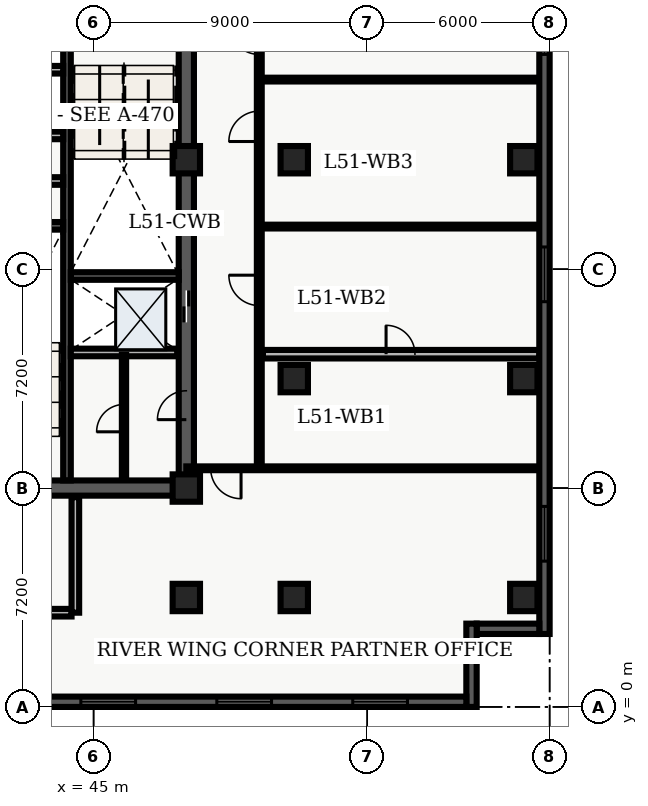
"""IFC4 building model, lengths in metres.
Left out: names, types, materials, properties, quantities, classifications, styles, units other than length and angle.
Written with IfcOpenShell. Run it as: python <this file> out.ifc"""

import sys

from ifc_helpers import new_model, entity, si_unit, converted_unit, direction, frame, origin_with_axes, origin_2d_with_axis, place, context, subcontext, project, spatial, polyline, rectangle, outline, extrude, element, fill, save


model = new_model("IFC4")
c1 = context("Model", 3, precision=1e-05, world=origin_with_axes(), true_north=direction((0.0, 1.0)))
c2 = subcontext(c1, "Body", "Model", "MODEL_VIEW")
j1 = project(units=[si_unit("LENGTHUNIT", "METRE"), converted_unit("PLANEANGLEUNIT", "DEGREE", entity("IfcPlaneAngleMeasure", 0.017), si_unit("PLANEANGLEUNIT", "RADIAN"), dimensions=[0, 0, 0, 0, 0, 0, 0])], contexts=[c1])
p1 = place(None, origin_with_axes())
s1 = spatial("IfcSite", under=j1, at=p1, CompositionType="ELEMENT")
p2 = place(p1, origin_with_axes())
s2 = spatial("IfcBuilding", under=s1, at=p2, CompositionType="ELEMENT")
p3 = place(p2, frame((0.0, 0.0, 208.2), z_axis=(0.0, 0.0, 1.0), x_axis=(1.0, 0.0, 0.0)))
s3 = spatial("IfcBuildingStorey", under=s2, at=p3, CompositionType="ELEMENT", Elevation=208.2)
p4 = place(p3, frame((40.2, 7.2, 0.0), z_axis=(0.0, 0.0, 1.0), x_axis=(1.0, 0.0, 0.0)))
e1 = element("IfcWall", 1, at=p4, inside=s3, PredefinedType="SHEAR", context=c2, shape_type="SweptSolid", body=[
    extrude(outline(polyline([(0.0, -0.25), (7.85, -0.25), (7.85, 0.25), (0.0, 0.25), (0.0, -0.25)])), origin_with_axes(), (0.0, 0.0, 1.0), 3.66),
])
p5 = place(p4, frame((2.175, 0.0, 0.0), z_axis=(0.0, 0.0, 1.0), x_axis=(1.0, 0.0, 0.0)))
e2 = element("IfcOpeningElement", 2, at=p5, cuts=e1, PredefinedType="OPENING", context=c2, shape_type="SweptSolid", body=[
    extrude(rectangle(XDim=1.05, YDim=0.52, at=origin_2d_with_axis()), origin_with_axes(), (0.0, 0.0, 1.0), 2.15),
])
p6 = place(p3, frame((48.05, 7.2, 0.0), z_axis=(0.0, 0.0, 1.0), x_axis=(0.0, 1.0, 0.0)))
e3 = element("IfcWall", 3, at=p6, inside=s3, PredefinedType="SHEAR", context=c2, shape_type="SweptSolid", body=[
    extrude(outline(polyline([(0.0, -0.25), (15.6, -0.25), (15.6, 0.25), (0.0, 0.25), (0.0, -0.25)])), origin_with_axes(), (0.0, 0.0, 1.0), 3.66),
])
p7 = place(p6, frame((5.975, 0.0, 0.0), z_axis=(0.0, 0.0, 1.0), x_axis=(1.0, 0.0, 0.0)))
e4 = element("IfcOpeningElement", 4, at=p7, cuts=e3, PredefinedType="OPENING", context=c2, shape_type="SweptSolid", body=[
    extrude(rectangle(XDim=1.05, YDim=0.52, at=origin_2d_with_axis()), origin_with_axes(), (0.0, 0.0, 1.0), 2.15),
])
p8 = place(p6, frame((2.725, 0.0, 0.0), z_axis=(0.0, 0.0, 1.0), x_axis=(1.0, 0.0, 0.0)))
e5 = element("IfcOpeningElement", 5, at=p8, cuts=e3, PredefinedType="OPENING", context=c2, shape_type="SweptSolid", body=[
    extrude(rectangle(XDim=0.95, YDim=0.52, at=origin_2d_with_axis()), origin_with_axes(), (0.0, 0.0, 1.0), 2.15),
])
p9 = place(p3, frame((44.125, 7.45, 0.0), z_axis=(0.0, 0.0, 1.0), x_axis=(0.0, 1.0, 0.0)))
e6 = element("IfcWall", 6, at=p9, inside=s3, PredefinedType="SHEAR", context=c2, shape_type="SweptSolid", body=[
    extrude(outline(polyline([(0.0, -0.125), (15.1, -0.125), (15.1, 0.125), (0.0, 0.125), (0.0, -0.125)])), origin_with_axes(), (0.0, 0.0, 1.0), 3.66),
])
for number, where, z_axis, x_axis in (
    (7, (40.45, 15.825, 0.0), (0.0, 0.0, 1.0), (1.0, 0.0, 0.0)),
    (8, (44.25, 14.175, 0.0), (0.0, 0.0, 1.0), (1.0, 0.0, 0.0)),
):
    element("IfcWall", number, at=place(p3, frame(where, z_axis=z_axis, x_axis=x_axis)), inside=s3, PredefinedType="SHEAR", context=c2, shape_type="SweptSolid", body=[
        extrude(outline(polyline([(0.0, -0.125), (3.55, -0.125), (3.55, 0.125), (0.0, 0.125), (0.0, -0.125)])), origin_with_axes(), (0.0, 0.0, 1.0), 3.66),
    ])
p10 = place(p3, frame((40.5, 17.3, 0.0), z_axis=(0.0, 0.0, 1.0), x_axis=(1.0, 0.0, 0.0)))
e9 = element("IfcWall", 9, at=p10, inside=s3, PredefinedType="SOLIDWALL", context=c2, shape_type="SweptSolid", body=[
    extrude(outline(polyline([(0.0, -0.125), (3.5, -0.125), (3.5, 0.125), (0.0, 0.125), (0.0, -0.125)])), origin_with_axes(), (0.0, 0.0, 1.0), 2.7),
])
p11 = place(p10, frame((2.4, 0.0, 0.0), z_axis=(0.0, 0.0, 1.0), x_axis=(1.0, 0.0, 0.0)))
e10 = element("IfcOpeningElement", 10, at=p11, cuts=e9, PredefinedType="OPENING", context=c2, shape_type="SweptSolid", body=[
    extrude(rectangle(XDim=0.9, YDim=0.27, at=origin_2d_with_axis()), origin_with_axes(), (0.0, 0.0, 1.0), 2.15),
])
p12 = place(p3, frame((40.5, 18.8, 0.0), z_axis=(0.0, 0.0, 1.0), x_axis=(1.0, 0.0, 0.0)))
e11 = element("IfcWall", 11, at=p12, inside=s3, PredefinedType="SOLIDWALL", context=c2, shape_type="SweptSolid", body=[
    extrude(outline(polyline([(0.0, -0.125), (3.5, -0.125), (3.5, 0.125), (0.0, 0.125), (0.0, -0.125)])), origin_with_axes(), (0.0, 0.0, 1.0), 2.7),
])
p13 = place(p3, frame((40.325, 3.1, 0.0), z_axis=(0.0, 0.0, 1.0), x_axis=(1.0, 0.0, 0.0)))
e12 = element("IfcWall", 12, at=p13, inside=s3, PredefinedType="SOLIDWALL", context=c2, shape_type="SweptSolid", body=[
    extrude(outline(polyline([(0.0, -0.125), (3.95, -0.125), (3.95, 0.125), (0.0, 0.125), (0.0, -0.125)])), origin_with_axes(), (0.0, 0.0, 1.0), 2.7),
])
p14 = place(p3, frame((44.4, 3.1, 0.0), z_axis=(0.0, 0.0, 1.0), x_axis=(0.0, 1.0, 0.0)))
e13 = element("IfcWall", 13, at=p14, inside=s3, PredefinedType="SOLIDWALL", context=c2, shape_type="SweptSolid", body=[
    extrude(outline(polyline([(0.0, -0.125), (3.8, -0.125), (3.8, 0.125), (0.0, 0.125), (0.0, -0.125)])), origin_with_axes(), (0.0, 0.0, 1.0), 2.7),
])
for number, where, z_axis, x_axis in (
    (14, (48.05, 3.6, 0.0), (0.0, 0.0, 1.0), (1.0, 0.0, 0.0)),
    (15, (48.05, 7.2, 0.0), (0.0, 0.0, 1.0), (1.0, 0.0, 0.0)),
    (16, (48.05, 18.0, 0.0), (0.0, 0.0, 1.0), (1.0, 0.0, 0.0)),
    (17, (51.6, 3.6, 0.0), (0.0, 0.0, 1.0), (1.0, 0.0, 0.0)),
    (18, (51.6, 10.8, 0.0), (0.0, 0.0, 1.0), (1.0, 0.0, 0.0)),
    (19, (51.6, 18.0, 0.0), (0.0, 0.0, 1.0), (1.0, 0.0, 0.0)),
    (20, (59.15, 3.6, 0.0), (0.0, 0.0, 1.0), (1.0, 0.0, 0.0)),
    (21, (59.15, 10.8, 0.0), (0.0, 0.0, 1.0), (1.0, 0.0, 0.0)),
    (22, (59.15, 18.0, 0.0), (0.0, 0.0, 1.0), (1.0, 0.0, 0.0)),
):
    element("IfcColumn", number, at=place(p3, frame(where, z_axis=z_axis, x_axis=x_axis)), inside=s3, PredefinedType="COLUMN", context=c2, shape_type="SweptSolid", body=[
        extrude(rectangle(XDim=0.9, YDim=0.9, at=origin_2d_with_axis()), origin_with_axes(), (0.0, 0.0, 1.0), 3.9),
    ])
for number, where, z_axis, x_axis in (
    (23, (40.5, 20.96, 0.0), (0.0, 0.0, 1.0), (1.0, 0.0, 0.0)),
    (24, (44.25, 11.66, 0.0), (0.0, 0.0, 1.0), (1.0, 0.0, 0.0)),
):
    element("IfcWall", number, at=place(p3, frame(where, z_axis=z_axis, x_axis=x_axis)), inside=s3, PredefinedType="SOLIDWALL", context=c2, shape_type="SweptSolid", body=[
        extrude(outline(polyline([(0.0, -0.125), (3.5, -0.125), (3.5, 0.125), (0.0, 0.125), (0.0, -0.125)])), origin_with_axes(), (0.0, 0.0, 1.0), 2.7),
    ])
p15 = place(p3, frame((46.0, 7.5, 0.0), z_axis=(0.0, 0.0, 1.0), x_axis=(0.0, 1.0, 0.0)))
e25 = element("IfcWall", 25, at=p15, inside=s3, PredefinedType="PARTITIONING", context=c2, shape_type="SweptSolid", body=[
    extrude(outline(polyline([(0.0, -0.07), (4.08, -0.07), (4.08, 0.07), (0.0, 0.07), (0.0, -0.07)])), origin_with_axes(), (0.0, 0.0, 1.0), 2.7),
])
p16 = place(p15, frame((2.0, 0.0, 0.0), z_axis=(0.0, 0.0, 1.0), x_axis=(1.0, 0.0, 0.0)))
e26 = element("IfcOpeningElement", 26, at=p16, cuts=e25, PredefinedType="OPENING", context=c2, shape_type="SweptSolid", body=[
    extrude(rectangle(XDim=0.9, YDim=0.16, at=origin_2d_with_axis()), origin_with_axes(), (0.0, 0.0, 1.0), 2.15),
])
p17 = place(p3, frame((50.45, 7.85, 0.0), z_axis=(0.0, 0.0, 1.0), x_axis=(0.0, 1.0, 0.0)))
e27 = element("IfcWall", 27, at=p17, inside=s3, PredefinedType="PARTITIONING", context=c2, shape_type="SweptSolid", body=[
    extrude(outline(polyline([(0.0, -0.08), (18.8, -0.08), (18.8, 0.08), (0.0, 0.08), (0.0, -0.08)])), origin_with_axes(), (0.0, 0.0, 1.0), 2.7),
])
p18 = place(p17, frame((5.852, 0.0, 0.0), z_axis=(0.0, 0.0, 1.0), x_axis=(1.0, 0.0, 0.0)))
e28 = element("IfcOpeningElement", 28, at=p18, cuts=e27, PredefinedType="OPENING", context=c2, shape_type="SweptSolid", body=[
    extrude(rectangle(XDim=1.0, YDim=0.18, at=origin_2d_with_axis()), origin_with_axes(), (0.0, 0.0, 1.0), 2.15),
])
p19 = place(p17, frame((11.249, 0.0, 0.0), z_axis=(0.0, 0.0, 1.0), x_axis=(1.0, 0.0, 0.0)))
e29 = element("IfcOpeningElement", 29, at=p19, cuts=e27, PredefinedType="OPENING", context=c2, shape_type="SweptSolid", body=[
    extrude(rectangle(XDim=1.0, YDim=0.18, at=origin_2d_with_axis()), origin_with_axes(), (0.0, 0.0, 1.0), 2.15),
])
p20 = place(p17, frame((14.113, 0.0, 0.0), z_axis=(0.0, 0.0, 1.0), x_axis=(1.0, 0.0, 0.0)))
e30 = element("IfcOpeningElement", 30, at=p20, cuts=e27, PredefinedType="OPENING", context=c2, shape_type="SweptSolid", body=[
    extrude(rectangle(XDim=1.0, YDim=0.18, at=origin_2d_with_axis()), origin_with_axes(), (0.0, 0.0, 1.0), 2.15),
])
p21 = place(p3, frame((59.665, 7.85, 0.0), z_axis=(0.0, 0.0, 1.0), x_axis=(-1.0, 0.0, 0.0)))
e31 = element("IfcWall", 31, at=p21, inside=s3, PredefinedType="PARTITIONING", context=c2, shape_type="SweptSolid", body=[
    extrude(outline(polyline([(0.0, -0.062), (11.615, -0.062), (11.615, 0.062), (0.0, 0.062), (0.0, -0.062)])), origin_with_axes(), (0.0, 0.0, 1.0), 2.7),
])
p22 = place(p21, frame((10.315, 0.0, 0.0), z_axis=(0.0, 0.0, 1.0), x_axis=(1.0, 0.0, 0.0)))
e32 = element("IfcOpeningElement", 32, at=p22, cuts=e31, PredefinedType="OPENING", context=c2, shape_type="SweptSolid", body=[
    extrude(rectangle(XDim=1.0, YDim=0.145, at=origin_2d_with_axis()), origin_with_axes(), (0.0, 0.0, 1.0), 2.15),
])
p23 = place(p3, frame((50.57, 11.603, 0.0), z_axis=(0.0, 0.0, 1.0), x_axis=(1.0, 0.0, 0.0)))
e33 = element("IfcWall", 33, at=p23, inside=s3, PredefinedType="PARTITIONING", context=c2, shape_type="SweptSolid", body=[
    extrude(outline(polyline([(0.0, -0.14), (9.095, -0.14), (9.095, 0.14), (0.0, 0.14), (0.0, -0.14)])), origin_with_axes(), (0.0, 0.0, 1.0), 2.7),
])
p24 = place(p23, frame((4.525, 0.0, 0.0), z_axis=(0.0, 0.0, 1.0), x_axis=(1.0, 0.0, 0.0)))
e34 = element("IfcOpeningElement", 34, at=p24, cuts=e33, PredefinedType="OPENING", context=c2, shape_type="SweptSolid", body=[
    extrude(rectangle(XDim=0.95, YDim=0.3, at=origin_2d_with_axis()), origin_with_axes(), (0.0, 0.0, 1.0), 2.15),
])
for number, where, z_axis, x_axis in (
    (35, (50.57, 15.801, 0.0), (0.0, 0.0, 1.0), (1.0, 0.0, 0.0)),
    (36, (50.57, 20.636, 0.0), (0.0, 0.0, 1.0), (1.0, 0.0, 0.0)),
):
    element("IfcWall", number, at=place(p3, frame(where, z_axis=z_axis, x_axis=x_axis)), inside=s3, PredefinedType="PARTITIONING", context=c2, shape_type="SweptSolid", body=[
        extrude(outline(polyline([(0.0, -0.062), (9.095, -0.062), (9.095, 0.062), (0.0, 0.062), (0.0, -0.062)])), origin_with_axes(), (0.0, 0.0, 1.0), 2.7),
    ])
p25 = place(p3, frame((59.83, 26.06, 0.0), z_axis=(0.0, 0.0, 1.0), x_axis=(0.0, -1.0, 0.0)))
e37 = element("IfcWall", 37, at=p25, inside=s3, PredefinedType="SOLIDWALL", context=c2, shape_type="SweptSolid", body=[
    extrude(outline(polyline([(0.0, -0.17), (23.66, -0.17), (23.66, 0.17), (0.0, 0.17), (0.0, -0.17)])), origin_with_axes(), (0.0, 0.0, 1.0), 3.66),
])
p26 = place(p25, frame((3.696, 0.0, 0.45), z_axis=(0.0, 0.0, 1.0), x_axis=(1.0, 0.0, 0.0)))
e38 = element("IfcOpeningElement", 38, at=p26, cuts=e37, PredefinedType="OPENING", context=c2, shape_type="SweptSolid", body=[
    extrude(rectangle(XDim=1.8, YDim=0.36, at=origin_2d_with_axis()), origin_with_axes(), (0.0, 0.0, 1.0), 2.1),
])
p27 = place(p25, frame((11.83, 0.0, 0.45), z_axis=(0.0, 0.0, 1.0), x_axis=(1.0, 0.0, 0.0)))
e39 = element("IfcOpeningElement", 39, at=p27, cuts=e37, PredefinedType="OPENING", context=c2, shape_type="SweptSolid", body=[
    extrude(rectangle(XDim=1.8, YDim=0.36, at=origin_2d_with_axis()), origin_with_axes(), (0.0, 0.0, 1.0), 2.1),
])
p28 = place(p25, frame((20.364, 0.0, 0.45), z_axis=(0.0, 0.0, 1.0), x_axis=(1.0, 0.0, 0.0)))
e40 = element("IfcOpeningElement", 40, at=p28, cuts=e37, PredefinedType="OPENING", context=c2, shape_type="SweptSolid", body=[
    extrude(rectangle(XDim=1.8, YDim=0.36, at=origin_2d_with_axis()), origin_with_axes(), (0.0, 0.0, 1.0), 2.1),
])
p29 = place(p3, frame((59.66, 2.57, 0.0), z_axis=(0.0, 0.0, 1.0), x_axis=(-1.0, 0.0, 0.0)))
e41 = element("IfcWall", 41, at=p29, inside=s3, PredefinedType="SOLIDWALL", context=c2, shape_type="SweptSolid", body=[
    extrude(outline(polyline([(0.0, -0.17), (2.06, -0.17), (2.06, 0.17), (0.0, 0.17), (0.0, -0.17)])), origin_with_axes(), (0.0, 0.0, 1.0), 3.66),
])
p30 = place(p3, frame((57.43, 2.74, 0.0), z_axis=(0.0, 0.0, 1.0), x_axis=(0.0, -1.0, 0.0)))
e42 = element("IfcWall", 42, at=p30, inside=s3, PredefinedType="SOLIDWALL", context=c2, shape_type="SweptSolid", body=[
    extrude(outline(polyline([(0.0, -0.17), (2.74, -0.17), (2.74, 0.17), (0.0, 0.17), (0.0, -0.17)])), origin_with_axes(), (0.0, 0.0, 1.0), 3.66),
])
p31 = place(p3, frame((57.26, 0.17, 0.0), z_axis=(0.0, 0.0, 1.0), x_axis=(-1.0, 0.0, 0.0)))
e43 = element("IfcWall", 43, at=p31, inside=s3, PredefinedType="SOLIDWALL", context=c2, shape_type="SweptSolid", body=[
    extrude(outline(polyline([(0.0, -0.17), (54.86, -0.17), (54.86, 0.17), (0.0, 0.17), (0.0, -0.17)])), origin_with_axes(), (0.0, 0.0, 1.0), 3.66),
])
p32 = place(p31, frame((2.836, 0.0, 0.45), z_axis=(0.0, 0.0, 1.0), x_axis=(1.0, 0.0, 0.0)))
e44 = element("IfcOpeningElement", 44, at=p32, cuts=e43, PredefinedType="OPENING", context=c2, shape_type="SweptSolid", body=[
    extrude(rectangle(XDim=1.8, YDim=0.36, at=origin_2d_with_axis()), origin_with_axes(), (0.0, 0.0, 1.0), 2.1),
])
p33 = place(p31, frame((7.307, 0.0, 0.45), z_axis=(0.0, 0.0, 1.0), x_axis=(1.0, 0.0, 0.0)))
e45 = element("IfcOpeningElement", 45, at=p33, cuts=e43, PredefinedType="OPENING", context=c2, shape_type="SweptSolid", body=[
    extrude(rectangle(XDim=1.8, YDim=0.36, at=origin_2d_with_axis()), origin_with_axes(), (0.0, 0.0, 1.0), 2.1),
])
p34 = place(p31, frame((11.779, 0.0, 0.45), z_axis=(0.0, 0.0, 1.0), x_axis=(1.0, 0.0, 0.0)))
e46 = element("IfcOpeningElement", 46, at=p34, cuts=e43, PredefinedType="OPENING", context=c2, shape_type="SweptSolid", body=[
    extrude(rectangle(XDim=1.8, YDim=0.36, at=origin_2d_with_axis()), origin_with_axes(), (0.0, 0.0, 1.0), 2.1),
])
p35 = place(p31, frame((16.251, 0.0, 0.45), z_axis=(0.0, 0.0, 1.0), x_axis=(1.0, 0.0, 0.0)))
e47 = element("IfcOpeningElement", 47, at=p35, cuts=e43, PredefinedType="OPENING", context=c2, shape_type="SweptSolid", body=[
    extrude(rectangle(XDim=1.8, YDim=0.36, at=origin_2d_with_axis()), origin_with_axes(), (0.0, 0.0, 1.0), 2.1),
])
p36 = place(p31, frame((20.723, 0.0, 0.45), z_axis=(0.0, 0.0, 1.0), x_axis=(1.0, 0.0, 0.0)))
e48 = element("IfcOpeningElement", 48, at=p36, cuts=e43, PredefinedType="OPENING", context=c2, shape_type="SweptSolid", body=[
    extrude(rectangle(XDim=1.8, YDim=0.36, at=origin_2d_with_axis()), origin_with_axes(), (0.0, 0.0, 1.0), 2.1),
])
p37 = place(p31, frame((25.194, 0.0, 0.45), z_axis=(0.0, 0.0, 1.0), x_axis=(1.0, 0.0, 0.0)))
e49 = element("IfcOpeningElement", 49, at=p37, cuts=e43, PredefinedType="OPENING", context=c2, shape_type="SweptSolid", body=[
    extrude(rectangle(XDim=1.8, YDim=0.36, at=origin_2d_with_axis()), origin_with_axes(), (0.0, 0.0, 1.0), 2.1),
])
p38 = place(p31, frame((29.666, 0.0, 0.45), z_axis=(0.0, 0.0, 1.0), x_axis=(1.0, 0.0, 0.0)))
e50 = element("IfcOpeningElement", 50, at=p38, cuts=e43, PredefinedType="OPENING", context=c2, shape_type="SweptSolid", body=[
    extrude(rectangle(XDim=1.8, YDim=0.36, at=origin_2d_with_axis()), origin_with_axes(), (0.0, 0.0, 1.0), 2.1),
])
p39 = place(p31, frame((34.138, 0.0, 0.45), z_axis=(0.0, 0.0, 1.0), x_axis=(1.0, 0.0, 0.0)))
e51 = element("IfcOpeningElement", 51, at=p39, cuts=e43, PredefinedType="OPENING", context=c2, shape_type="SweptSolid", body=[
    extrude(rectangle(XDim=1.8, YDim=0.36, at=origin_2d_with_axis()), origin_with_axes(), (0.0, 0.0, 1.0), 2.1),
])
p40 = place(p31, frame((38.609, 0.0, 0.45), z_axis=(0.0, 0.0, 1.0), x_axis=(1.0, 0.0, 0.0)))
e52 = element("IfcOpeningElement", 52, at=p40, cuts=e43, PredefinedType="OPENING", context=c2, shape_type="SweptSolid", body=[
    extrude(rectangle(XDim=1.8, YDim=0.36, at=origin_2d_with_axis()), origin_with_axes(), (0.0, 0.0, 1.0), 2.1),
])
p41 = place(p31, frame((43.081, 0.0, 0.45), z_axis=(0.0, 0.0, 1.0), x_axis=(1.0, 0.0, 0.0)))
e53 = element("IfcOpeningElement", 53, at=p41, cuts=e43, PredefinedType="OPENING", context=c2, shape_type="SweptSolid", body=[
    extrude(rectangle(XDim=1.8, YDim=0.36, at=origin_2d_with_axis()), origin_with_axes(), (0.0, 0.0, 1.0), 2.1),
])
p42 = place(p31, frame((47.553, 0.0, 0.45), z_axis=(0.0, 0.0, 1.0), x_axis=(1.0, 0.0, 0.0)))
e54 = element("IfcOpeningElement", 54, at=p42, cuts=e43, PredefinedType="OPENING", context=c2, shape_type="SweptSolid", body=[
    extrude(rectangle(XDim=1.8, YDim=0.36, at=origin_2d_with_axis()), origin_with_axes(), (0.0, 0.0, 1.0), 2.1),
])
p43 = place(p31, frame((52.024, 0.0, 0.45), z_axis=(0.0, 0.0, 1.0), x_axis=(1.0, 0.0, 0.0)))
e55 = element("IfcOpeningElement", 55, at=p43, cuts=e43, PredefinedType="OPENING", context=c2, shape_type="SweptSolid", body=[
    extrude(rectangle(XDim=1.8, YDim=0.36, at=origin_2d_with_axis()), origin_with_axes(), (0.0, 0.0, 1.0), 2.1),
])
p44 = place(p6, frame((5.975, 0.0, 0.0), z_axis=(0.0, 0.0, 1.0), x_axis=(1.0, 0.0, 0.0)))
e56 = element("IfcDoor", 56, at=p44, inside=s3, OperationType="SLIDING_TO_LEFT", PredefinedType="DOOR", context=c2, shape_type="SweptSolid", body=[
    extrude(rectangle(XDim=1.05, YDim=0.09, at=origin_2d_with_axis()), origin_with_axes(), (0.0, 0.0, 1.0), 2.15),
])
fill(e4, e56)
p45 = place(p15, frame((2.0, 0.0, 0.0), z_axis=(0.0, 0.0, 1.0), x_axis=(1.0, 0.0, 0.0)))
e57 = element("IfcDoor", 57, at=p45, inside=s3, OperationType="SINGLE_SWING_LEFT", PredefinedType="DOOR", context=c2, shape_type="SweptSolid", body=[
    extrude(rectangle(XDim=0.9, YDim=0.084, at=origin_2d_with_axis()), origin_with_axes(), (0.0, 0.0, 1.0), 2.15),
])
fill(e26, e57)
p46 = place(p6, frame((2.725, 0.0, 0.0), z_axis=(0.0, 0.0, 1.0), x_axis=(1.0, 0.0, 0.0)))
e58 = element("IfcDoor", 58, at=p46, inside=s3, OperationType="SINGLE_SWING_LEFT", PredefinedType="DOOR", context=c2, shape_type="SweptSolid", body=[
    extrude(rectangle(XDim=0.95, YDim=0.09, at=origin_2d_with_axis()), origin_with_axes(), (0.0, 0.0, 1.0), 2.15),
])
fill(e5, e58)
p47 = place(p21, frame((10.315, 0.0, 0.0), z_axis=(0.0, 0.0, 1.0), x_axis=(1.0, 0.0, 0.0)))
e59 = element("IfcDoor", 59, at=p47, inside=s3, OperationType="SINGLE_SWING_LEFT", PredefinedType="DOOR", context=c2, shape_type="SweptSolid", body=[
    extrude(rectangle(XDim=1.0, YDim=0.075, at=origin_2d_with_axis()), origin_with_axes(), (0.0, 0.0, 1.0), 2.15),
])
fill(e32, e59)
p48 = place(p23, frame((4.525, 0.0, 0.0), z_axis=(0.0, 0.0, 1.0), x_axis=(1.0, 0.0, 0.0)))
e60 = element("IfcDoor", 60, at=p48, inside=s3, OperationType="SINGLE_SWING_LEFT", PredefinedType="DOOR", context=c2, shape_type="SweptSolid", body=[
    extrude(rectangle(XDim=0.95, YDim=0.09, at=origin_2d_with_axis()), origin_with_axes(), (0.0, 0.0, 1.0), 2.15),
])
fill(e34, e60)
p49 = place(p17, frame((5.852, 0.0, 0.0), z_axis=(0.0, 0.0, 1.0), x_axis=(1.0, 0.0, 0.0)))
e61 = element("IfcDoor", 61, at=p49, inside=s3, OperationType="SINGLE_SWING_RIGHT", PredefinedType="DOOR", context=c2, shape_type="SweptSolid", body=[
    extrude(rectangle(XDim=1.0, YDim=0.09, at=origin_2d_with_axis()), origin_with_axes(), (0.0, 0.0, 1.0), 2.15),
])
fill(e28, e61)
p50 = place(p17, frame((11.249, 0.0, 0.0), z_axis=(0.0, 0.0, 1.0), x_axis=(1.0, 0.0, 0.0)))
e62 = element("IfcDoor", 62, at=p50, inside=s3, OperationType="SINGLE_SWING_LEFT", PredefinedType="DOOR", context=c2, shape_type="SweptSolid", body=[
    extrude(rectangle(XDim=1.0, YDim=0.09, at=origin_2d_with_axis()), origin_with_axes(), (0.0, 0.0, 1.0), 2.15),
])
fill(e29, e62)
p51 = place(p17, frame((14.113, 0.0, 0.0), z_axis=(0.0, 0.0, 1.0), x_axis=(1.0, 0.0, 0.0)))
e63 = element("IfcDoor", 63, at=p51, inside=s3, OperationType="SINGLE_SWING_RIGHT", PredefinedType="DOOR", context=c2, shape_type="SweptSolid", body=[
    extrude(rectangle(XDim=1.0, YDim=0.09, at=origin_2d_with_axis()), origin_with_axes(), (0.0, 0.0, 1.0), 2.15),
])
fill(e30, e63)
p52 = place(p25, frame((3.696, 0.0, 0.45), z_axis=(0.0, 0.0, 1.0), x_axis=(1.0, 0.0, 0.0)))
e64 = element("IfcWindow", 64, at=p52, inside=s3, PredefinedType="WINDOW", context=c2, shape_type="SweptSolid", body=[
    extrude(rectangle(XDim=1.8, YDim=0.09, at=origin_2d_with_axis()), origin_with_axes(), (0.0, 0.0, 1.0), 2.1),
])
fill(e38, e64)
p53 = place(p25, frame((11.83, 0.0, 0.45), z_axis=(0.0, 0.0, 1.0), x_axis=(1.0, 0.0, 0.0)))
e65 = element("IfcWindow", 65, at=p53, inside=s3, PredefinedType="WINDOW", context=c2, shape_type="SweptSolid", body=[
    extrude(rectangle(XDim=1.8, YDim=0.09, at=origin_2d_with_axis()), origin_with_axes(), (0.0, 0.0, 1.0), 2.1),
])
fill(e39, e65)
p54 = place(p25, frame((20.364, 0.0, 0.45), z_axis=(0.0, 0.0, 1.0), x_axis=(1.0, 0.0, 0.0)))
e66 = element("IfcWindow", 66, at=p54, inside=s3, PredefinedType="WINDOW", context=c2, shape_type="SweptSolid", body=[
    extrude(rectangle(XDim=1.8, YDim=0.09, at=origin_2d_with_axis()), origin_with_axes(), (0.0, 0.0, 1.0), 2.1),
])
fill(e40, e66)
p55 = place(p31, frame((2.836, 0.0, 0.45), z_axis=(0.0, 0.0, 1.0), x_axis=(1.0, 0.0, 0.0)))
e67 = element("IfcWindow", 67, at=p55, inside=s3, PredefinedType="WINDOW", context=c2, shape_type="SweptSolid", body=[
    extrude(rectangle(XDim=1.8, YDim=0.09, at=origin_2d_with_axis()), origin_with_axes(), (0.0, 0.0, 1.0), 2.1),
])
fill(e44, e67)
p56 = place(p31, frame((7.307, 0.0, 0.45), z_axis=(0.0, 0.0, 1.0), x_axis=(1.0, 0.0, 0.0)))
e68 = element("IfcWindow", 68, at=p56, inside=s3, PredefinedType="WINDOW", context=c2, shape_type="SweptSolid", body=[
    extrude(rectangle(XDim=1.8, YDim=0.09, at=origin_2d_with_axis()), origin_with_axes(), (0.0, 0.0, 1.0), 2.1),
])
fill(e45, e68)
p57 = place(p31, frame((11.779, 0.0, 0.45), z_axis=(0.0, 0.0, 1.0), x_axis=(1.0, 0.0, 0.0)))
e69 = element("IfcWindow", 69, at=p57, inside=s3, PredefinedType="WINDOW", context=c2, shape_type="SweptSolid", body=[
    extrude(rectangle(XDim=1.8, YDim=0.09, at=origin_2d_with_axis()), origin_with_axes(), (0.0, 0.0, 1.0), 2.1),
])
fill(e46, e69)
save(model, sys.argv[1])
